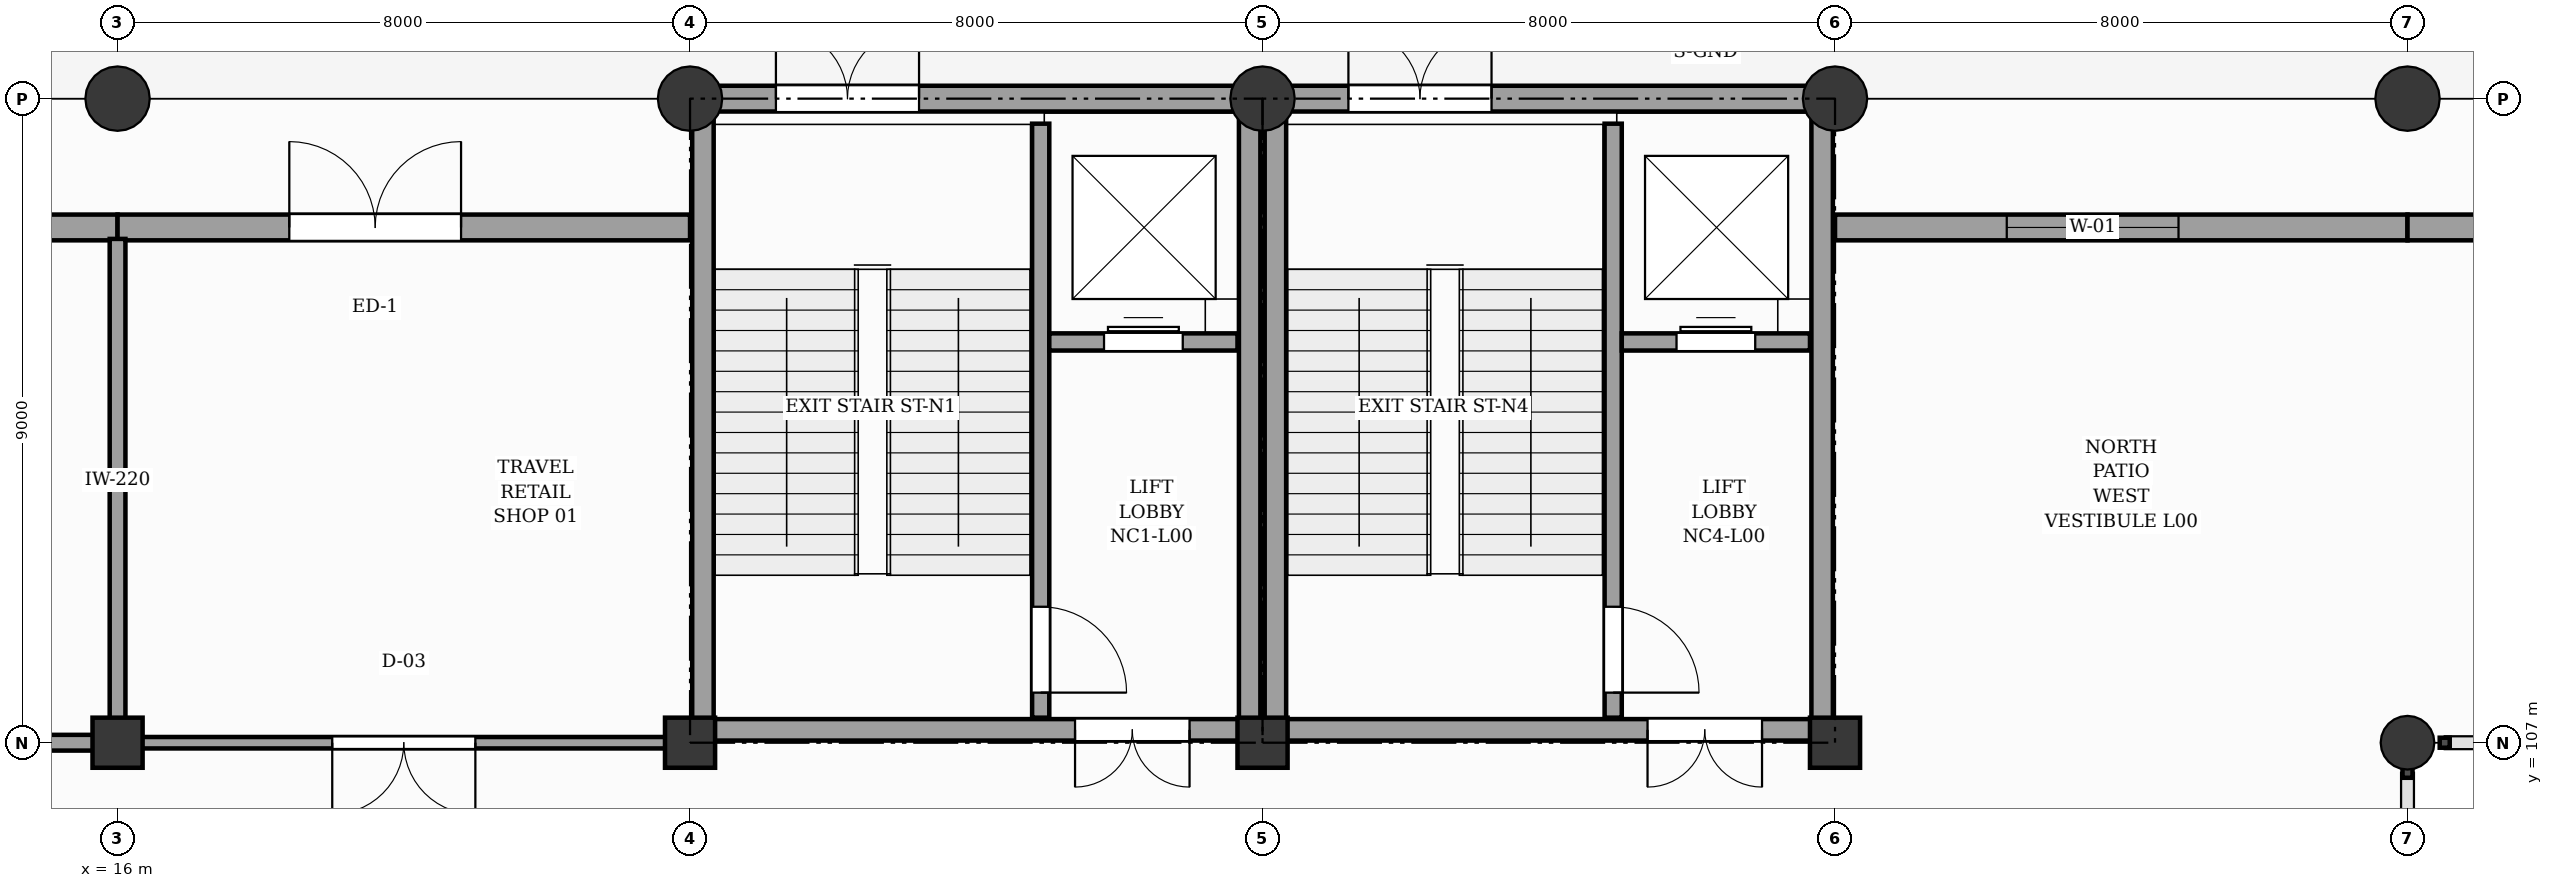
"""IFC4 building model, lengths in metres.
Left out: names, types, materials, properties, quantities, classifications, styles, units other than length and angle.
Written with IfcOpenShell. Run it as: python <this file> out.ifc"""

import sys

from ifc_helpers import new_model, si_unit, direction, frame, frame_2d, origin, origin_2d, place, context, subcontext, project, spatial, rectangle, circle, extrude, element, fill, save


model = new_model("IFC4")
c1 = context("Model", 3, precision=1e-05, world=origin(), true_north=direction((0.0, 1.0)))
c2 = subcontext(c1, "Body", "Model", "MODEL_VIEW")
j1 = project(units=[si_unit("LENGTHUNIT", "METRE"), si_unit("PLANEANGLEUNIT", "RADIAN")], contexts=[c1])
p1 = place(None, origin())
s1 = spatial("IfcSite", under=j1, at=p1, CompositionType="ELEMENT")
p2 = place(p1, origin())
s2 = spatial("IfcBuilding", under=s1, at=p2, CompositionType="ELEMENT")
p3 = place(p2, origin())
s3 = spatial("IfcBuildingStorey", under=s2, at=p3, CompositionType="ELEMENT", Elevation=0.0)
p4 = place(p3, frame((16.0, 107.0, -0.3), z_axis=(0.0, 0.0, 1.0), x_axis=(1.0, 0.0, 0.0)))
e1 = element("IfcColumn", 1, at=p4, inside=s3, PredefinedType="COLUMN", context=c2, shape_type="SweptSolid", body=[
    extrude(rectangle(XDim=0.7, YDim=0.7, at=origin_2d()), origin(), (0.0, 0.0, 1.0), 5.1),
])
p5 = place(p3, frame((16.0, 116.0, -0.3), z_axis=(0.0, 0.0, 1.0), x_axis=(1.0, 0.0, 0.0)))
e2 = element("IfcColumn", 2, at=p5, inside=s3, PredefinedType="PILASTER", context=c2, shape_type="SweptSolid", body=[
    extrude(circle(Radius=0.45, at=origin_2d()), origin(), (0.0, 0.0, 1.0), 5.1),
])
p6 = place(p3, frame((24.0, 107.0, -0.3), z_axis=(0.0, 0.0, 1.0), x_axis=(1.0, 0.0, 0.0)))
e3 = element("IfcColumn", 3, at=p6, inside=s3, PredefinedType="COLUMN", context=c2, shape_type="SweptSolid", body=[
    extrude(rectangle(XDim=0.7, YDim=0.7, at=origin_2d()), origin(), (0.0, 0.0, 1.0), 5.1),
])
p7 = place(p3, frame((24.0, 116.0, -0.3), z_axis=(0.0, 0.0, 1.0), x_axis=(1.0, 0.0, 0.0)))
e4 = element("IfcColumn", 4, at=p7, inside=s3, PredefinedType="PILASTER", context=c2, shape_type="SweptSolid", body=[
    extrude(circle(Radius=0.45, at=origin_2d()), origin(), (0.0, 0.0, 1.0), 5.1),
])
p8 = place(p3, frame((32.0, 107.0, -0.3), z_axis=(0.0, 0.0, 1.0), x_axis=(1.0, 0.0, 0.0)))
e5 = element("IfcColumn", 5, at=p8, inside=s3, PredefinedType="COLUMN", context=c2, shape_type="SweptSolid", body=[
    extrude(rectangle(XDim=0.7, YDim=0.7, at=origin_2d()), origin(), (0.0, 0.0, 1.0), 5.1),
])
p9 = place(p3, frame((32.0, 116.0, -0.3), z_axis=(0.0, 0.0, 1.0), x_axis=(1.0, 0.0, 0.0)))
e6 = element("IfcColumn", 6, at=p9, inside=s3, PredefinedType="PILASTER", context=c2, shape_type="SweptSolid", body=[
    extrude(circle(Radius=0.45, at=origin_2d()), origin(), (0.0, 0.0, 1.0), 5.1),
])
p10 = place(p3, frame((40.0, 107.0, -0.3), z_axis=(0.0, 0.0, 1.0), x_axis=(1.0, 0.0, 0.0)))
e7 = element("IfcColumn", 7, at=p10, inside=s3, PredefinedType="COLUMN", context=c2, shape_type="SweptSolid", body=[
    extrude(rectangle(XDim=0.7, YDim=0.7, at=origin_2d()), origin(), (0.0, 0.0, 1.0), 5.1),
])
p11 = place(p3, frame((40.0, 116.0, -0.3), z_axis=(0.0, 0.0, 1.0), x_axis=(1.0, 0.0, 0.0)))
e8 = element("IfcColumn", 8, at=p11, inside=s3, PredefinedType="PILASTER", context=c2, shape_type="SweptSolid", body=[
    extrude(circle(Radius=0.45, at=origin_2d()), origin(), (0.0, 0.0, 1.0), 5.1),
])
p12 = place(p3, frame((48.0, 107.0, -0.3), z_axis=(0.0, 0.0, 1.0), x_axis=(1.0, 0.0, 0.0)))
e9 = element("IfcColumn", 9, at=p12, inside=s3, PredefinedType="PILASTER", context=c2, shape_type="SweptSolid", body=[
    extrude(circle(Radius=0.375, at=origin_2d()), origin(), (0.0, 0.0, 1.0), 5.1),
])
p13 = place(p3, frame((48.0, 116.0, -0.3), z_axis=(0.0, 0.0, 1.0), x_axis=(1.0, 0.0, 0.0)))
e10 = element("IfcColumn", 10, at=p13, inside=s3, PredefinedType="PILASTER", context=c2, shape_type="SweptSolid", body=[
    extrude(circle(Radius=0.45, at=origin_2d()), origin(), (0.0, 0.0, 1.0), 5.1),
])
p14 = place(p3, frame((8.0, 114.2, 0.0), z_axis=(0.0, 0.0, 1.0), x_axis=(1.0, 0.0, 0.0)))
e11 = element("IfcWall", 11, at=p14, inside=s3, PredefinedType="SOLIDWALL", context=c2, shape_type="SweptSolid", body=[
    extrude(rectangle(XDim=8.0, YDim=0.36, at=frame_2d((4.0, 0.0))), origin(), (0.0, 0.0, 1.0), 3.84),
])
p15 = place(p14, frame((3.0, 0.0, 0.0)))
e12 = element("IfcOpeningElement", 12, at=p15, cuts=e11, PredefinedType="OPENING", context=c2, shape_type="SweptSolid", body=[
    extrude(rectangle(XDim=1.2, YDim=2.2, at=frame_2d((0.6, 1.1))), frame((0.0, 0.19, 0.0), z_axis=(0.0, -1.0, 0.0), x_axis=(1.0, 0.0, 0.0)), (0.0, 0.0, 1.0), 0.38),
])
p16 = place(p3, frame((16.0, 114.2, 0.0), z_axis=(0.0, 0.0, 1.0), x_axis=(1.0, 0.0, 0.0)))
e13 = element("IfcWall", 13, at=p16, inside=s3, PredefinedType="SOLIDWALL", context=c2, shape_type="SweptSolid", body=[
    extrude(rectangle(XDim=8.0, YDim=0.36, at=frame_2d((4.0, 0.0))), origin(), (0.0, 0.0, 1.0), 3.84),
])
p17 = place(p16, frame((2.4, 0.0, 0.0)))
e14 = element("IfcOpeningElement", 14, at=p17, cuts=e13, PredefinedType="OPENING", context=c2, shape_type="SweptSolid", body=[
    extrude(rectangle(XDim=2.4, YDim=2.35, at=frame_2d((1.2, 1.175))), frame((0.0, 0.19, 0.0), z_axis=(0.0, -1.0, 0.0), x_axis=(1.0, 0.0, 0.0)), (0.0, 0.0, 1.0), 0.38),
])
p18 = place(p3, frame((24.4, 116.0, 0.0), z_axis=(0.0, 0.0, 1.0), x_axis=(1.0, 0.0, 0.0)))
e15 = element("IfcWall", 15, at=p18, inside=s3, PredefinedType="SOLIDWALL", context=c2, shape_type="SweptSolid", body=[
    extrude(rectangle(XDim=7.2, YDim=0.36, at=frame_2d((3.6, 0.0))), origin(), (0.0, 0.0, 1.0), 3.84),
])
p19 = place(p18, frame((0.8, 0.0, 0.0)))
e16 = element("IfcOpeningElement", 16, at=p19, cuts=e15, PredefinedType="OPENING", context=c2, shape_type="SweptSolid", body=[
    extrude(rectangle(XDim=2.0, YDim=2.2, at=frame_2d((1.0, 1.1))), frame((0.0, 0.19, 0.0), z_axis=(0.0, -1.0, 0.0), x_axis=(1.0, 0.0, 0.0)), (0.0, 0.0, 1.0), 0.38),
])
p20 = place(p3, frame((32.4, 116.0, 0.0), z_axis=(0.0, 0.0, 1.0), x_axis=(1.0, 0.0, 0.0)))
e17 = element("IfcWall", 17, at=p20, inside=s3, PredefinedType="SOLIDWALL", context=c2, shape_type="SweptSolid", body=[
    extrude(rectangle(XDim=7.2, YDim=0.36, at=frame_2d((3.6, 0.0))), origin(), (0.0, 0.0, 1.0), 3.84),
])
p21 = place(p20, frame((0.8, 0.0, 0.0)))
e18 = element("IfcOpeningElement", 18, at=p21, cuts=e17, PredefinedType="OPENING", context=c2, shape_type="SweptSolid", body=[
    extrude(rectangle(XDim=2.0, YDim=2.2, at=frame_2d((1.0, 1.1))), frame((0.0, 0.19, 0.0), z_axis=(0.0, -1.0, 0.0), x_axis=(1.0, 0.0, 0.0)), (0.0, 0.0, 1.0), 0.38),
])
p22 = place(p3, frame((40.0, 114.2, 0.0), z_axis=(0.0, 0.0, 1.0), x_axis=(1.0, 0.0, 0.0)))
e19 = element("IfcWall", 19, at=p22, inside=s3, PredefinedType="SOLIDWALL", context=c2, shape_type="SweptSolid", body=[
    extrude(rectangle(XDim=8.0, YDim=0.36, at=frame_2d((4.0, 0.0))), origin(), (0.0, 0.0, 1.0), 3.84),
])
p23 = place(p22, frame((2.4, 0.0, 0.9)))
e20 = element("IfcOpeningElement", 20, at=p23, cuts=e19, PredefinedType="OPENING", context=c2, shape_type="SweptSolid", body=[
    extrude(rectangle(XDim=2.4, YDim=2.6, at=frame_2d((1.2, 1.3))), frame((0.0, 0.19, 0.0), z_axis=(0.0, -1.0, 0.0), x_axis=(1.0, 0.0, 0.0)), (0.0, 0.0, 1.0), 0.38),
])
p24 = place(p3, frame((48.0, 114.2, 0.0), z_axis=(0.0, 0.0, 1.0), x_axis=(1.0, 0.0, 0.0)))
e21 = element("IfcWall", 21, at=p24, inside=s3, PredefinedType="SOLIDWALL", context=c2, shape_type="SweptSolid", body=[
    extrude(rectangle(XDim=8.0, YDim=0.36, at=frame_2d((4.0, 0.0))), origin(), (0.0, 0.0, 1.0), 3.84),
])
p25 = place(p24, frame((2.4, 0.0, 0.0)))
e22 = element("IfcOpeningElement", 22, at=p25, cuts=e21, PredefinedType="OPENING", context=c2, shape_type="SweptSolid", body=[
    extrude(rectangle(XDim=2.4, YDim=2.35, at=frame_2d((1.2, 1.175))), frame((0.0, 0.19, 0.0), z_axis=(0.0, -1.0, 0.0), x_axis=(1.0, 0.0, 0.0)), (0.0, 0.0, 1.0), 0.38),
])
p26 = place(p3, frame((28.9, 107.35, 0.0), z_axis=(0.0, 0.0, 1.0), x_axis=(0.0, 1.0, 0.0)))
e23 = element("IfcWall", 23, at=p26, inside=s3, PredefinedType="SHEAR", context=c2, shape_type="SweptSolid", body=[
    extrude(rectangle(XDim=8.3, YDim=0.24, at=frame_2d((4.15, 0.0))), origin(), (0.0, 0.0, 1.0), 4.52),
])
p27 = place(p26, frame((0.35, 0.0, 0.0)))
e24 = element("IfcOpeningElement", 24, at=p27, cuts=e23, PredefinedType="OPENING", context=c2, shape_type="SweptSolid", body=[
    extrude(rectangle(XDim=1.2, YDim=2.15, at=frame_2d((0.6, 1.075))), frame((0.0, 0.13, 0.0), z_axis=(0.0, -1.0, 0.0), x_axis=(1.0, 0.0, 0.0)), (0.0, 0.0, 1.0), 0.26),
])
p28 = place(p3, frame((29.02, 112.6, 0.0), z_axis=(0.0, 0.0, 1.0), x_axis=(1.0, 0.0, 0.0)))
e25 = element("IfcWall", 25, at=p28, inside=s3, PredefinedType="SHEAR", context=c2, shape_type="SweptSolid", body=[
    extrude(rectangle(XDim=2.63, YDim=0.24, at=frame_2d((1.315, 0.0))), origin(), (0.0, 0.0, 1.0), 4.52),
])
p29 = place(p28, frame((0.765, 0.0, 0.0)))
e26 = element("IfcOpeningElement", 26, at=p29, cuts=e25, PredefinedType="OPENING", context=c2, shape_type="SweptSolid", body=[
    extrude(rectangle(XDim=1.1, YDim=2.15, at=frame_2d((0.55, 1.075))), frame((0.0, 0.13, 0.0), z_axis=(0.0, -1.0, 0.0), x_axis=(1.0, 0.0, 0.0)), (0.0, 0.0, 1.0), 0.26),
])
for number, where, z_axis, x_axis in (
    (27, (24.18, 107.18, 0.0), (0.0, 0.0, 1.0), (0.0, 1.0, 0.0)),
    (28, (31.82, 107.18, 0.0), (0.0, 0.0, 1.0), (0.0, 1.0, 0.0)),
):
    element("IfcWall", number, at=place(p3, frame(where, z_axis=z_axis, x_axis=x_axis)), inside=s3, PredefinedType="SHEAR", context=c2, shape_type="SweptSolid", body=[
        extrude(rectangle(XDim=8.64, YDim=0.3, at=frame_2d((4.32, 0.0))), origin(), (0.0, 0.0, 1.0), 4.52),
    ])
p30 = place(p3, frame((24.03, 107.18, 0.0), z_axis=(0.0, 0.0, 1.0), x_axis=(1.0, 0.0, 0.0)))
e29 = element("IfcWall", 29, at=p30, inside=s3, PredefinedType="SHEAR", context=c2, shape_type="SweptSolid", body=[
    extrude(rectangle(XDim=7.94, YDim=0.3, at=frame_2d((3.97, 0.0))), origin(), (0.0, 0.0, 1.0), 4.52),
])
p31 = place(p30, frame((5.35, 0.0, 0.0)))
e30 = element("IfcOpeningElement", 30, at=p31, cuts=e29, PredefinedType="OPENING", context=c2, shape_type="SweptSolid", body=[
    extrude(rectangle(XDim=1.6, YDim=2.15, at=frame_2d((0.8, 1.075))), frame((0.0, 0.16, 0.0), z_axis=(0.0, -1.0, 0.0), x_axis=(1.0, 0.0, 0.0)), (0.0, 0.0, 1.0), 0.32),
])
p32 = place(p3, frame((36.9, 107.35, 0.0), z_axis=(0.0, 0.0, 1.0), x_axis=(0.0, 1.0, 0.0)))
e31 = element("IfcWall", 31, at=p32, inside=s3, PredefinedType="SHEAR", context=c2, shape_type="SweptSolid", body=[
    extrude(rectangle(XDim=8.3, YDim=0.24, at=frame_2d((4.15, 0.0))), origin(), (0.0, 0.0, 1.0), 4.52),
])
p33 = place(p32, frame((0.35, 0.0, 0.0)))
e32 = element("IfcOpeningElement", 32, at=p33, cuts=e31, PredefinedType="OPENING", context=c2, shape_type="SweptSolid", body=[
    extrude(rectangle(XDim=1.2, YDim=2.15, at=frame_2d((0.6, 1.075))), frame((0.0, 0.13, 0.0), z_axis=(0.0, -1.0, 0.0), x_axis=(1.0, 0.0, 0.0)), (0.0, 0.0, 1.0), 0.26),
])
p34 = place(p3, frame((37.02, 112.6, 0.0), z_axis=(0.0, 0.0, 1.0), x_axis=(1.0, 0.0, 0.0)))
e33 = element("IfcWall", 33, at=p34, inside=s3, PredefinedType="SHEAR", context=c2, shape_type="SweptSolid", body=[
    extrude(rectangle(XDim=2.63, YDim=0.24, at=frame_2d((1.315, 0.0))), origin(), (0.0, 0.0, 1.0), 4.52),
])
p35 = place(p34, frame((0.765, 0.0, 0.0)))
e34 = element("IfcOpeningElement", 34, at=p35, cuts=e33, PredefinedType="OPENING", context=c2, shape_type="SweptSolid", body=[
    extrude(rectangle(XDim=1.1, YDim=2.15, at=frame_2d((0.55, 1.075))), frame((0.0, 0.13, 0.0), z_axis=(0.0, -1.0, 0.0), x_axis=(1.0, 0.0, 0.0)), (0.0, 0.0, 1.0), 0.26),
])
for number, where, z_axis, x_axis in (
    (35, (32.18, 107.18, 0.0), (0.0, 0.0, 1.0), (0.0, 1.0, 0.0)),
    (36, (39.82, 107.18, 0.0), (0.0, 0.0, 1.0), (0.0, 1.0, 0.0)),
):
    element("IfcWall", number, at=place(p3, frame(where, z_axis=z_axis, x_axis=x_axis)), inside=s3, PredefinedType="SHEAR", context=c2, shape_type="SweptSolid", body=[
        extrude(rectangle(XDim=8.64, YDim=0.3, at=frame_2d((4.32, 0.0))), origin(), (0.0, 0.0, 1.0), 4.52),
    ])
p36 = place(p3, frame((32.03, 107.18, 0.0), z_axis=(0.0, 0.0, 1.0), x_axis=(1.0, 0.0, 0.0)))
e37 = element("IfcWall", 37, at=p36, inside=s3, PredefinedType="SHEAR", context=c2, shape_type="SweptSolid", body=[
    extrude(rectangle(XDim=7.94, YDim=0.3, at=frame_2d((3.97, 0.0))), origin(), (0.0, 0.0, 1.0), 4.52),
])
p37 = place(p36, frame((5.35, 0.0, 0.0)))
e38 = element("IfcOpeningElement", 38, at=p37, cuts=e37, PredefinedType="OPENING", context=c2, shape_type="SweptSolid", body=[
    extrude(rectangle(XDim=1.6, YDim=2.15, at=frame_2d((0.8, 1.075))), frame((0.0, 0.16, 0.0), z_axis=(0.0, -1.0, 0.0), x_axis=(1.0, 0.0, 0.0)), (0.0, 0.0, 1.0), 0.32),
])
p38 = place(p3, frame((8.3, 107.0, 0.0), z_axis=(0.0, 0.0, 1.0), x_axis=(1.0, 0.0, 0.0)))
e39 = element("IfcWall", 39, at=p38, inside=s3, PredefinedType="SOLIDWALL", context=c2, shape_type="SweptSolid", body=[
    extrude(rectangle(XDim=7.4, YDim=0.22, at=frame_2d((3.7, 0.0))), origin(), (0.0, 0.0, 1.0), 3.7),
])
p39 = place(p38, frame((3.15, 0.0, 0.0)))
e40 = element("IfcOpeningElement", 40, at=p39, cuts=e39, PredefinedType="OPENING", context=c2, shape_type="SweptSolid", body=[
    extrude(rectangle(XDim=1.1, YDim=2.15, at=frame_2d((0.55, 1.075))), frame((0.0, 0.12, 0.0), z_axis=(0.0, -1.0, 0.0), x_axis=(1.0, 0.0, 0.0)), (0.0, 0.0, 1.0), 0.24),
])
p40 = place(p3, frame((16.0, 107.3, 0.0), z_axis=(0.0, 0.0, 1.0), x_axis=(0.0, 1.0, 0.0)))
e41 = element("IfcWall", 41, at=p40, inside=s3, PredefinedType="SOLIDWALL", context=c2, shape_type="SweptSolid", body=[
    extrude(rectangle(XDim=6.74, YDim=0.22, at=frame_2d((3.37, 0.0))), origin(), (0.0, 0.0, 1.0), 3.7),
])
p41 = place(p3, frame((16.3, 107.0, 0.0), z_axis=(0.0, 0.0, 1.0), x_axis=(1.0, 0.0, 0.0)))
e42 = element("IfcWall", 42, at=p41, inside=s3, PredefinedType="PARTITIONING", context=c2, shape_type="SweptSolid", body=[
    extrude(rectangle(XDim=7.4, YDim=0.16, at=frame_2d((3.7, 0.0))), origin(), (0.0, 0.0, 1.0), 3.7),
])
p42 = place(p41, frame((2.7, 0.0, 0.0)))
e43 = element("IfcOpeningElement", 43, at=p42, cuts=e42, PredefinedType="OPENING", context=c2, shape_type="SweptSolid", body=[
    extrude(rectangle(XDim=2.0, YDim=2.3, at=frame_2d((1.0, 1.15))), frame((0.0, 0.09, 0.0), z_axis=(0.0, -1.0, 0.0), x_axis=(1.0, 0.0, 0.0)), (0.0, 0.0, 1.0), 0.18),
])
p43 = place(p17, origin())
e44 = element("IfcDoor", 44, at=p43, inside=s3, OperationType="DOUBLE_DOOR_SINGLE_SWING", PredefinedType="DOOR", context=c2, shape_type="SweptSolid", body=[
    extrude(rectangle(XDim=2.4, YDim=2.35, at=frame_2d((1.2, 1.175))), frame((0.0, 0.025, 0.0), z_axis=(0.0, -1.0, 0.0), x_axis=(1.0, 0.0, 0.0)), (0.0, 0.0, 1.0), 0.05),
])
fill(e14, e44)
p44 = place(p19, origin())
e45 = element("IfcDoor", 45, at=p44, inside=s3, OperationType="DOUBLE_DOOR_SINGLE_SWING", PredefinedType="DOOR", context=c2, shape_type="SweptSolid", body=[
    extrude(rectangle(XDim=2.0, YDim=2.2, at=frame_2d((1.0, 1.1))), frame((0.0, 0.025, 0.0), z_axis=(0.0, -1.0, 0.0), x_axis=(1.0, 0.0, 0.0)), (0.0, 0.0, 1.0), 0.05),
])
fill(e16, e45)
p45 = place(p21, origin())
e46 = element("IfcDoor", 46, at=p45, inside=s3, OperationType="DOUBLE_DOOR_SINGLE_SWING", PredefinedType="DOOR", context=c2, shape_type="SweptSolid", body=[
    extrude(rectangle(XDim=2.0, YDim=2.2, at=frame_2d((1.0, 1.1))), frame((0.0, 0.025, 0.0), z_axis=(0.0, -1.0, 0.0), x_axis=(1.0, 0.0, 0.0)), (0.0, 0.0, 1.0), 0.05),
])
fill(e18, e46)
p46 = place(p23, origin())
e47 = element("IfcWindow", 47, at=p46, inside=s3, PartitioningType="SINGLE_PANEL", PredefinedType="WINDOW", context=c2, shape_type="SweptSolid", body=[
    extrude(rectangle(XDim=2.4, YDim=2.6, at=frame_2d((1.2, 1.3))), frame((0.0, 0.03, 0.0), z_axis=(0.0, -1.0, 0.0), x_axis=(1.0, 0.0, 0.0)), (0.0, 0.0, 1.0), 0.06),
])
fill(e20, e47)
p47 = place(p27, frame((1.2, 0.0, 0.0), z_axis=(0.0, 0.0, 1.0), x_axis=(-1.0, 0.0, 0.0)))
e48 = element("IfcDoor", 48, at=p47, inside=s3, OperationType="SINGLE_SWING_LEFT", PredefinedType="DOOR", context=c2, shape_type="SweptSolid", body=[
    extrude(rectangle(XDim=1.2, YDim=2.15, at=frame_2d((0.6, 1.075))), frame((0.0, 0.025, 0.0), z_axis=(0.0, -1.0, 0.0), x_axis=(1.0, 0.0, 0.0)), (0.0, 0.0, 1.0), 0.05),
])
fill(e24, e48)
p48 = place(p29, origin())
e49 = element("IfcDoor", 49, at=p48, inside=s3, OperationType="DOUBLE_DOOR_SLIDING", PredefinedType="DOOR", context=c2, shape_type="SweptSolid", body=[
    extrude(rectangle(XDim=1.1, YDim=2.15, at=frame_2d((0.55, 1.075))), frame((0.0, 0.025, 0.0), z_axis=(0.0, -1.0, 0.0), x_axis=(1.0, 0.0, 0.0)), (0.0, 0.0, 1.0), 0.05),
])
fill(e26, e49)
p49 = place(p31, frame((1.6, 0.0, 0.0), z_axis=(0.0, 0.0, 1.0), x_axis=(-1.0, 0.0, 0.0)))
e50 = element("IfcDoor", 50, at=p49, inside=s3, OperationType="DOUBLE_DOOR_SINGLE_SWING", PredefinedType="DOOR", context=c2, shape_type="SweptSolid", body=[
    extrude(rectangle(XDim=1.6, YDim=2.15, at=frame_2d((0.8, 1.075))), frame((0.0, 0.025, 0.0), z_axis=(0.0, -1.0, 0.0), x_axis=(1.0, 0.0, 0.0)), (0.0, 0.0, 1.0), 0.05),
])
fill(e30, e50)
p50 = place(p33, frame((1.2, 0.0, 0.0), z_axis=(0.0, 0.0, 1.0), x_axis=(-1.0, 0.0, 0.0)))
e51 = element("IfcDoor", 51, at=p50, inside=s3, OperationType="SINGLE_SWING_LEFT", PredefinedType="DOOR", context=c2, shape_type="SweptSolid", body=[
    extrude(rectangle(XDim=1.2, YDim=2.15, at=frame_2d((0.6, 1.075))), frame((0.0, 0.025, 0.0), z_axis=(0.0, -1.0, 0.0), x_axis=(1.0, 0.0, 0.0)), (0.0, 0.0, 1.0), 0.05),
])
fill(e32, e51)
p51 = place(p35, origin())
e52 = element("IfcDoor", 52, at=p51, inside=s3, OperationType="DOUBLE_DOOR_SLIDING", PredefinedType="DOOR", context=c2, shape_type="SweptSolid", body=[
    extrude(rectangle(XDim=1.1, YDim=2.15, at=frame_2d((0.55, 1.075))), frame((0.0, 0.025, 0.0), z_axis=(0.0, -1.0, 0.0), x_axis=(1.0, 0.0, 0.0)), (0.0, 0.0, 1.0), 0.05),
])
fill(e34, e52)
p52 = place(p37, frame((1.6, 0.0, 0.0), z_axis=(0.0, 0.0, 1.0), x_axis=(-1.0, 0.0, 0.0)))
e53 = element("IfcDoor", 53, at=p52, inside=s3, OperationType="DOUBLE_DOOR_SINGLE_SWING", PredefinedType="DOOR", context=c2, shape_type="SweptSolid", body=[
    extrude(rectangle(XDim=1.6, YDim=2.15, at=frame_2d((0.8, 1.075))), frame((0.0, 0.025, 0.0), z_axis=(0.0, -1.0, 0.0), x_axis=(1.0, 0.0, 0.0)), (0.0, 0.0, 1.0), 0.05),
])
fill(e38, e53)
p53 = place(p42, frame((2.0, 0.0, 0.0), z_axis=(0.0, 0.0, 1.0), x_axis=(-1.0, 0.0, 0.0)))
e54 = element("IfcDoor", 54, at=p53, inside=s3, OperationType="DOUBLE_DOOR_SINGLE_SWING", PredefinedType="DOOR", context=c2, shape_type="SweptSolid", body=[
    extrude(rectangle(XDim=2.0, YDim=2.3, at=frame_2d((1.0, 1.15))), frame((0.0, 0.025, 0.0), z_axis=(0.0, -1.0, 0.0), x_axis=(1.0, 0.0, 0.0)), (0.0, 0.0, 1.0), 0.05),
])
fill(e43, e54)
save(model, sys.argv[1])
